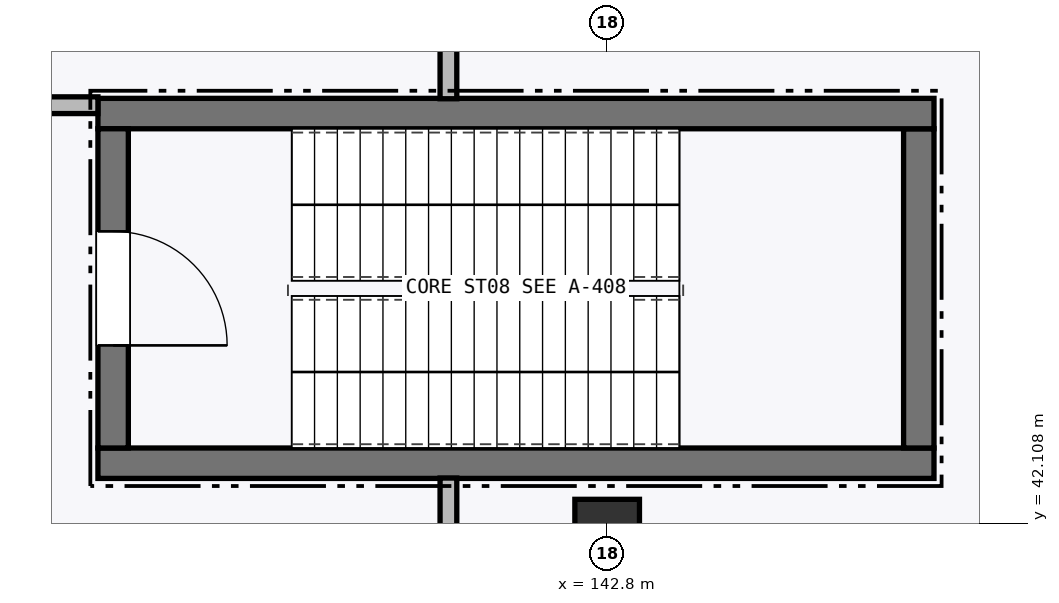
"""IFC4 building model, lengths in metres.
Left out: names, types, materials, properties, quantities, classifications, styles, units other than length and angle.
Written with IfcOpenShell. Run it as: python <this file> out.ifc"""

import sys

from ifc_helpers import new_model, si_unit, direction, frame, frame_2d, origin, origin_2d, place, context, subcontext, project, spatial, rectangle, extrude, element, fill, save


model = new_model("IFC4")
c1 = context("Model", 3, precision=1e-05, world=origin(), true_north=direction((0.0, 1.0)))
c2 = subcontext(c1, "Body", "Model", "MODEL_VIEW")
j1 = project(units=[si_unit("LENGTHUNIT", "METRE"), si_unit("PLANEANGLEUNIT", "RADIAN")], contexts=[c1])
p1 = place(None, origin())
s1 = spatial("IfcSite", under=j1, at=p1, CompositionType="ELEMENT")
p2 = place(p1, origin())
s2 = spatial("IfcBuilding", under=s1, at=p2, CompositionType="ELEMENT")
p3 = place(p2, frame((0.0, 0.0, -5.4)))
s3 = spatial("IfcBuildingStorey", under=s2, at=p3, CompositionType="ELEMENT", Elevation=-5.4)
p4 = place(p3, frame((142.8, 42.0, 0.0), z_axis=(0.0, 0.0, 1.0), x_axis=(1.0, 0.0, 0.0)))
e1 = element("IfcColumn", 1, at=p4, inside=s3, PredefinedType="COLUMN", context=c2, shape_type="SweptSolid", body=[
    extrude(rectangle(XDim=0.85, YDim=0.85, at=origin_2d()), origin(), (0.0, 0.0, 1.0), 5.4),
])
p5 = place(p3, frame((136.1, 42.9, 0.0), z_axis=(0.0, 0.0, 1.0), x_axis=(1.0, 0.0, 0.0)))
e2 = element("IfcWall", 2, at=p5, inside=s3, PredefinedType="SHEAR", context=c2, shape_type="SweptSolid", body=[
    extrude(rectangle(XDim=11.0, YDim=0.4, at=frame_2d((5.5, 0.0))), origin(), (0.0, 0.0, 1.0), 5.145),
])
p6 = place(p3, frame((146.9, 43.1, 0.0), z_axis=(0.0, 0.0, 1.0), x_axis=(0.0, 1.0, 0.0)))
e3 = element("IfcWall", 3, at=p6, inside=s3, PredefinedType="SHEAR", context=c2, shape_type="SweptSolid", body=[
    extrude(rectangle(XDim=4.2, YDim=0.4, at=frame_2d((2.1, 0.0))), origin(), (0.0, 0.0, 1.0), 5.145),
])
p7 = place(p3, frame((147.1, 47.5, 0.0), z_axis=(0.0, 0.0, 1.0), x_axis=(-1.0, 0.0, 0.0)))
e4 = element("IfcWall", 4, at=p7, inside=s3, PredefinedType="SHEAR", context=c2, shape_type="SweptSolid", body=[
    extrude(rectangle(XDim=11.0, YDim=0.4, at=frame_2d((5.5, 0.0))), origin(), (0.0, 0.0, 1.0), 5.145),
])
p8 = place(p3, frame((136.3, 47.3, 0.0), z_axis=(0.0, 0.0, 1.0), x_axis=(0.0, -1.0, 0.0)))
e5 = element("IfcWall", 5, at=p8, inside=s3, PredefinedType="SHEAR", context=c2, shape_type="SweptSolid", body=[
    extrude(rectangle(XDim=4.2, YDim=0.4, at=frame_2d((2.1, 0.0))), origin(), (0.0, 0.0, 1.0), 5.145),
])
p9 = place(p8, frame((1.35, 0.0, 0.0)))
e6 = element("IfcOpeningElement", 6, at=p9, cuts=e5, PredefinedType="OPENING", context=c2, shape_type="SweptSolid", body=[
    extrude(rectangle(XDim=1.5, YDim=2.15, at=frame_2d((0.75, 1.075))), frame((0.0, 0.21, 0.0), z_axis=(0.0, -1.0, 0.0), x_axis=(1.0, 0.0, 0.0)), (0.0, 0.0, 1.0), 0.42),
])
p10 = place(p3, frame((133.3, 47.61, 0.0), z_axis=(0.0, 0.0, 1.0), x_axis=(1.0, 0.0, 0.0)))
e7 = element("IfcWall", 7, at=p10, inside=s3, PredefinedType="PARTITIONING", context=c2, shape_type="SweptSolid", body=[
    extrude(rectangle(XDim=2.8, YDim=0.22, at=frame_2d((1.4, 0.0))), origin(), (0.0, 0.0, 1.0), 5.145),
])
p11 = place(p3, frame((140.711, 47.695, 0.0), z_axis=(0.0, 0.0, 1.0), x_axis=(0.0, 1.0, 0.0)))
e8 = element("IfcWall", 8, at=p11, inside=s3, PredefinedType="PARTITIONING", context=c2, shape_type="SweptSolid", body=[
    extrude(rectangle(XDim=2.24, YDim=0.22, at=frame_2d((1.12, 0.0))), origin(), (0.0, 0.0, 1.0), 5.145),
])
p12 = place(p3, frame((140.711, 42.705, 0.0), z_axis=(0.0, 0.0, 1.0), x_axis=(0.0, -1.0, 0.0)))
e9 = element("IfcWall", 9, at=p12, inside=s3, PredefinedType="PARTITIONING", context=c2, shape_type="SweptSolid", body=[
    extrude(rectangle(XDim=3.39, YDim=0.22, at=frame_2d((1.695, 0.0))), origin(), (0.0, 0.0, 1.0), 5.145),
])
p13 = place(p9, origin())
e10 = element("IfcDoor", 10, at=p13, inside=s3, OperationType="SINGLE_SWING_RIGHT", PredefinedType="DOOR", context=c2, shape_type="SweptSolid", body=[
    extrude(rectangle(XDim=1.5, YDim=2.15, at=frame_2d((0.75, 1.075))), frame((0.0, 0.025, 0.0), z_axis=(0.0, -1.0, 0.0), x_axis=(1.0, 0.0, 0.0)), (0.0, 0.0, 1.0), 0.05),
])
fill(e6, e10)
save(model, sys.argv[1])
